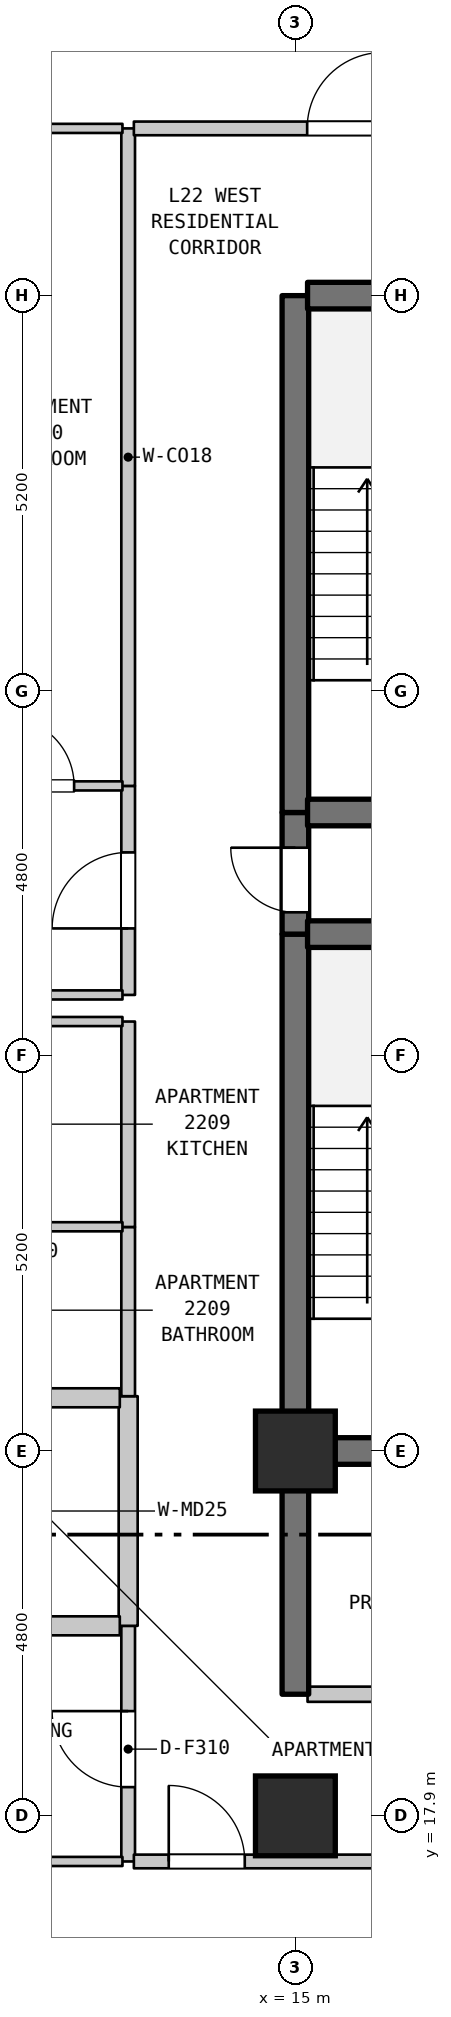
"""IFC4 building model, lengths in metres.
Left out: names, types, materials, properties, quantities, classifications, styles, units other than length and angle.
Written with IfcOpenShell. Run it as: python <this file> out.ifc"""

import sys

from ifc_helpers import new_model, si_unit, direction, frame, frame_2d, origin, origin_2d, place, context, subcontext, project, spatial, rectangle, extrude, element, fill, save


model = new_model("IFC4")
c1 = context("Model", 3, precision=1e-05, world=origin(), true_north=direction((0.0, 1.0)))
c2 = subcontext(c1, "Body", "Model", "MODEL_VIEW")
j1 = project(units=[si_unit("LENGTHUNIT", "METRE"), si_unit("PLANEANGLEUNIT", "RADIAN")], contexts=[c1])
p1 = place(None, origin())
s1 = spatial("IfcSite", under=j1, at=p1, CompositionType="ELEMENT")
p2 = place(p1, origin())
s2 = spatial("IfcBuilding", under=s1, at=p2, CompositionType="ELEMENT")
p3 = place(p2, frame((0.0, 0.0, 94.6)))
s3 = spatial("IfcBuildingStorey", under=s2, at=p3, CompositionType="ELEMENT", Elevation=94.6)
for number, where, z_axis, x_axis in (
    (1, (15.0, 17.9, 0.0), (0.0, 0.0, 1.0), (1.0, 0.0, 0.0)),
    (2, (15.0, 22.7, 0.0), (0.0, 0.0, 1.0), (1.0, 0.0, 0.0)),
):
    element("IfcColumn", number, at=place(p3, frame(where, z_axis=z_axis, x_axis=x_axis)), inside=s3, PredefinedType="COLUMN", context=c2, shape_type="SweptSolid", body=[
        extrude(rectangle(XDim=1.05, YDim=1.05, at=origin_2d()), origin(), (0.0, 0.0, 1.0), 3.7),
    ])
p4 = place(p3, frame((12.8, 17.3, 0.0), z_axis=(0.0, 0.0, 1.0), x_axis=(0.0, 1.0, 0.0)))
e3 = element("IfcWall", 3, at=p4, inside=s3, PredefinedType="STANDARD", context=c2, shape_type="SweptSolid", body=[
    extrude(rectangle(XDim=3.1, YDim=0.18, at=frame_2d((1.55, 0.0))), origin(), (0.0, 0.0, 1.0), 3.385),
])
p5 = place(p4, frame((0.978, 0.0, 0.0)))
e4 = element("IfcOpeningElement", 4, at=p5, cuts=e3, PredefinedType="OPENING", context=c2, shape_type="SweptSolid", body=[
    extrude(rectangle(XDim=1.0, YDim=2.15, at=frame_2d((0.5, 1.075))), frame((0.0, 0.1, 0.0), z_axis=(0.0, -1.0, 0.0), x_axis=(1.0, 0.0, 0.0)), (0.0, 0.0, 1.0), 0.2),
])
p6 = place(p3, frame((12.8, 20.4, 0.0), z_axis=(0.0, 0.0, 1.0), x_axis=(0.0, 1.0, 0.0)))
e5 = element("IfcWall", 5, at=p6, inside=s3, PredefinedType="STANDARD", context=c2, shape_type="SweptSolid", body=[
    extrude(rectangle(XDim=3.021, YDim=0.25, at=frame_2d((1.51, 0.0))), origin(), (0.0, 0.0, 1.0), 3.385),
])
p7 = place(p3, frame((12.8, 23.421, 0.0), z_axis=(0.0, 0.0, 1.0), x_axis=(0.0, 1.0, 0.0)))
e6 = element("IfcWall", 6, at=p7, inside=s3, PredefinedType="STANDARD", context=c2, shape_type="SweptSolid", body=[
    extrude(rectangle(XDim=2.226, YDim=0.18, at=frame_2d((1.113, 0.0))), origin(), (0.0, 0.0, 1.0), 3.385),
])
p8 = place(p3, frame((12.8, 25.647, 0.0), z_axis=(0.0, 0.0, 1.0), x_axis=(0.0, 1.0, 0.0)))
e7 = element("IfcWall", 7, at=p8, inside=s3, PredefinedType="STANDARD", context=c2, shape_type="SweptSolid", body=[
    extrude(rectangle(XDim=2.703, YDim=0.18, at=frame_2d((1.352, 0.0))), origin(), (0.0, 0.0, 1.0), 3.385),
])
p9 = place(p3, frame((12.8, 28.7, 0.0), z_axis=(0.0, 0.0, 1.0), x_axis=(0.0, 1.0, 0.0)))
e8 = element("IfcWall", 8, at=p9, inside=s3, PredefinedType="STANDARD", context=c2, shape_type="SweptSolid", body=[
    extrude(rectangle(XDim=2.75, YDim=0.18, at=frame_2d((1.375, 0.0))), origin(), (0.0, 0.0, 1.0), 3.385),
])
p10 = place(p9, frame((0.875, 0.0, 0.0)))
e9 = element("IfcOpeningElement", 9, at=p10, cuts=e8, PredefinedType="OPENING", context=c2, shape_type="SweptSolid", body=[
    extrude(rectangle(XDim=1.0, YDim=2.15, at=frame_2d((0.5, 1.075))), frame((0.0, 0.1, 0.0), z_axis=(0.0, -1.0, 0.0), x_axis=(1.0, 0.0, 0.0)), (0.0, 0.0, 1.0), 0.2),
])
p11 = place(p3, frame((12.8, 31.45, 0.0), z_axis=(0.0, 0.0, 1.0), x_axis=(0.0, 1.0, 0.0)))
e10 = element("IfcWall", 10, at=p11, inside=s3, PredefinedType="STANDARD", context=c2, shape_type="SweptSolid", body=[
    extrude(rectangle(XDim=8.65, YDim=0.18, at=frame_2d((4.325, 0.0))), origin(), (0.0, 0.0, 1.0), 3.385),
])
p12 = place(p3, frame((15.0, 19.5, 0.0), z_axis=(0.0, 0.0, 1.0), x_axis=(0.0, 1.0, 0.0)))
e11 = element("IfcWall", 11, at=p12, inside=s3, PredefinedType="SHEAR", context=c2, shape_type="SweptSolid", body=[
    extrude(rectangle(XDim=3.2, YDim=0.35, at=frame_2d((1.6, 0.0))), origin(), (0.0, 0.0, 1.0), 3.385),
])
p13 = place(p3, frame((15.0, 22.7, 0.0), z_axis=(0.0, 0.0, 1.0), x_axis=(0.0, 1.0, 0.0)))
e12 = element("IfcWall", 12, at=p13, inside=s3, PredefinedType="SHEAR", context=c2, shape_type="SweptSolid", body=[
    extrude(rectangle(XDim=6.8, YDim=0.35, at=frame_2d((3.4, 0.0))), origin(), (0.0, 0.0, 1.0), 3.385),
])
p14 = place(p3, frame((15.0, 29.5, 0.0), z_axis=(0.0, 0.0, 1.0), x_axis=(0.0, 1.0, 0.0)))
e13 = element("IfcWall", 13, at=p14, inside=s3, PredefinedType="SHEAR", context=c2, shape_type="SweptSolid", body=[
    extrude(rectangle(XDim=1.6, YDim=0.35, at=frame_2d((0.8, 0.0))), origin(), (0.0, 0.0, 1.0), 3.385),
])
p15 = place(p14, frame((0.287, 0.0, 0.0)))
e14 = element("IfcOpeningElement", 14, at=p15, cuts=e13, PredefinedType="OPENING", context=c2, shape_type="SweptSolid", body=[
    extrude(rectangle(XDim=0.85, YDim=2.1, at=frame_2d((0.425, 1.05))), frame((0.0, 0.185, 0.0), z_axis=(0.0, -1.0, 0.0), x_axis=(1.0, 0.0, 0.0)), (0.0, 0.0, 1.0), 0.37),
])
p16 = place(p3, frame((15.0, 31.1, 0.0), z_axis=(0.0, 0.0, 1.0), x_axis=(0.0, 1.0, 0.0)))
e15 = element("IfcWall", 15, at=p16, inside=s3, PredefinedType="SHEAR", context=c2, shape_type="SweptSolid", body=[
    extrude(rectangle(XDim=6.8, YDim=0.35, at=frame_2d((3.4, 0.0))), origin(), (0.0, 0.0, 1.0), 3.385),
])
p17 = place(p3, frame((9.085, 17.3, 0.0), z_axis=(0.0, 0.0, 1.0), x_axis=(1.0, 0.0, 0.0)))
e16 = element("IfcWall", 16, at=p17, inside=s3, PredefinedType="PARTITIONING", context=c2, shape_type="SweptSolid", body=[
    extrude(rectangle(XDim=3.64, YDim=0.12, at=frame_2d((1.82, 0.0))), origin(), (0.0, 0.0, 1.0), 3.385),
])
p18 = place(p3, frame((12.875, 17.3, 0.0), z_axis=(0.0, 0.0, 1.0), x_axis=(1.0, 0.0, 0.0)))
e17 = element("IfcWall", 17, at=p18, inside=s3, PredefinedType="STANDARD", context=c2, shape_type="SweptSolid", body=[
    extrude(rectangle(XDim=3.5, YDim=0.18, at=frame_2d((1.75, 0.0))), origin(), (0.0, 0.0, 1.0), 3.385),
])
p19 = place(p18, frame((0.459, 0.0, 0.0)))
e18 = element("IfcOpeningElement", 18, at=p19, cuts=e17, PredefinedType="OPENING", context=c2, shape_type="SweptSolid", body=[
    extrude(rectangle(XDim=1.0, YDim=2.15, at=frame_2d((0.5, 1.075))), frame((0.0, 0.1, 0.0), z_axis=(0.0, -1.0, 0.0), x_axis=(1.0, 0.0, 0.0)), (0.0, 0.0, 1.0), 0.2),
])
p20 = place(p3, frame((15.16, 19.5, 0.0), z_axis=(0.0, 0.0, 1.0), x_axis=(1.0, 0.0, 0.0)))
e19 = element("IfcWall", 19, at=p20, inside=s3, PredefinedType="STANDARD", context=c2, shape_type="SweptSolid", body=[
    extrude(rectangle(XDim=3.68, YDim=0.2, at=frame_2d((1.84, 0.0))), origin(), (0.0, 0.0, 1.0), 3.385),
])
p21 = place(p20, frame((1.39, 0.0, 0.0)))
e20 = element("IfcOpeningElement", 20, at=p21, cuts=e19, PredefinedType="OPENING", context=c2, shape_type="SweptSolid", body=[
    extrude(rectangle(XDim=0.9, YDim=2.15, at=frame_2d((0.45, 1.075))), frame((0.0, 0.11, 0.0), z_axis=(0.0, -1.0, 0.0), x_axis=(1.0, 0.0, 0.0)), (0.0, 0.0, 1.0), 0.22),
])
p22 = place(p3, frame((10.66, 20.4, 0.0), z_axis=(0.0, 0.0, 1.0), x_axis=(1.0, 0.0, 0.0)))
e21 = element("IfcWall", 21, at=p22, inside=s3, PredefinedType="STANDARD", context=c2, shape_type="SweptSolid", body=[
    extrude(rectangle(XDim=2.03, YDim=0.25, at=frame_2d((1.015, 0.0))), origin(), (0.0, 0.0, 1.0), 3.385),
])
p23 = place(p3, frame((15.16, 22.7, 0.0), z_axis=(0.0, 0.0, 1.0), x_axis=(1.0, 0.0, 0.0)))
e22 = element("IfcWall", 22, at=p23, inside=s3, PredefinedType="SHEAR", context=c2, shape_type="SweptSolid", body=[
    extrude(rectangle(XDim=3.68, YDim=0.35, at=frame_2d((1.84, 0.0))), origin(), (0.0, 0.0, 1.0), 3.385),
])
p24 = place(p3, frame((10.66, 23.4, 0.0), z_axis=(0.0, 0.0, 1.0), x_axis=(1.0, 0.0, 0.0)))
e23 = element("IfcWall", 23, at=p24, inside=s3, PredefinedType="STANDARD", context=c2, shape_type="SweptSolid", body=[
    extrude(rectangle(XDim=2.03, YDim=0.25, at=frame_2d((1.015, 0.0))), origin(), (0.0, 0.0, 1.0), 3.385),
])
for number, where, z_axis, x_axis in (
    (24, (10.595, 25.65, 0.0), (0.0, 0.0, 1.0), (1.0, 0.0, 0.0)),
    (25, (10.595, 28.35, 0.0), (0.0, 0.0, 1.0), (1.0, 0.0, 0.0)),
):
    element("IfcWall", number, at=place(p3, frame(where, z_axis=z_axis, x_axis=x_axis)), inside=s3, PredefinedType="PARTITIONING", context=c2, shape_type="SweptSolid", body=[
        extrude(rectangle(XDim=2.13, YDim=0.12, at=frame_2d((1.065, 0.0))), origin(), (0.0, 0.0, 1.0), 3.385),
    ])
p25 = place(p3, frame((9.03, 28.7, 0.0), z_axis=(0.0, 0.0, 1.0), x_axis=(1.0, 0.0, 0.0)))
e26 = element("IfcWall", 26, at=p25, inside=s3, PredefinedType="PARTITIONING", context=c2, shape_type="SweptSolid", body=[
    extrude(rectangle(XDim=3.695, YDim=0.12, at=frame_2d((1.848, 0.0))), origin(), (0.0, 0.0, 1.0), 3.385),
])
for number, where, z_axis, x_axis in (
    (27, (15.16, 29.5, 0.0), (0.0, 0.0, 1.0), (1.0, 0.0, 0.0)),
    (28, (15.16, 31.1, 0.0), (0.0, 0.0, 1.0), (1.0, 0.0, 0.0)),
):
    element("IfcWall", number, at=place(p3, frame(where, z_axis=z_axis, x_axis=x_axis)), inside=s3, PredefinedType="SHEAR", context=c2, shape_type="SweptSolid", body=[
        extrude(rectangle(XDim=3.68, YDim=0.35, at=frame_2d((1.84, 0.0))), origin(), (0.0, 0.0, 1.0), 3.385),
    ])
p26 = place(p3, frame((10.523, 31.45, 0.0), z_axis=(0.0, 0.0, 1.0), x_axis=(1.0, 0.0, 0.0)))
e29 = element("IfcWall", 29, at=p26, inside=s3, PredefinedType="PARTITIONING", context=c2, shape_type="SweptSolid", body=[
    extrude(rectangle(XDim=2.202, YDim=0.12, at=frame_2d((1.101, 0.0))), origin(), (0.0, 0.0, 1.0), 3.385),
])
p27 = place(p26, frame((0.666, 0.0, 0.0)))
e30 = element("IfcOpeningElement", 30, at=p27, cuts=e29, PredefinedType="OPENING", context=c2, shape_type="SweptSolid", body=[
    extrude(rectangle(XDim=0.9, YDim=2.1, at=frame_2d((0.45, 1.05))), frame((0.0, 0.07, 0.0), z_axis=(0.0, -1.0, 0.0), x_axis=(1.0, 0.0, 0.0)), (0.0, 0.0, 1.0), 0.14),
])
p28 = place(p3, frame((15.16, 37.9, 0.0), z_axis=(0.0, 0.0, 1.0), x_axis=(1.0, 0.0, 0.0)))
e31 = element("IfcWall", 31, at=p28, inside=s3, PredefinedType="SHEAR", context=c2, shape_type="SweptSolid", body=[
    extrude(rectangle(XDim=3.68, YDim=0.35, at=frame_2d((1.84, 0.0))), origin(), (0.0, 0.0, 1.0), 3.385),
])
p29 = place(p3, frame((10.523, 40.1, 0.0), z_axis=(0.0, 0.0, 1.0), x_axis=(1.0, 0.0, 0.0)))
e32 = element("IfcWall", 32, at=p29, inside=s3, PredefinedType="PARTITIONING", context=c2, shape_type="SweptSolid", body=[
    extrude(rectangle(XDim=2.202, YDim=0.12, at=frame_2d((1.101, 0.0))), origin(), (0.0, 0.0, 1.0), 3.385),
])
p30 = place(p3, frame((12.875, 40.1, 0.0), z_axis=(0.0, 0.0, 1.0), x_axis=(1.0, 0.0, 0.0)))
e33 = element("IfcWall", 33, at=p30, inside=s3, PredefinedType="STANDARD", context=c2, shape_type="SweptSolid", body=[
    extrude(rectangle(XDim=5.59, YDim=0.18, at=frame_2d((2.795, 0.0))), origin(), (0.0, 0.0, 1.0), 3.385),
])
p31 = place(p30, frame((2.28, 0.0, 0.0)))
e34 = element("IfcOpeningElement", 34, at=p31, cuts=e33, PredefinedType="OPENING", context=c2, shape_type="SweptSolid", body=[
    extrude(rectangle(XDim=1.0, YDim=2.15, at=frame_2d((0.5, 1.075))), frame((0.0, 0.1, 0.0), z_axis=(0.0, -1.0, 0.0), x_axis=(1.0, 0.0, 0.0)), (0.0, 0.0, 1.0), 0.2),
])
p32 = place(p5, origin())
e35 = element("IfcDoor", 35, at=p32, inside=s3, OperationType="SINGLE_SWING_RIGHT", PredefinedType="DOOR", context=c2, shape_type="SweptSolid", body=[
    extrude(rectangle(XDim=1.0, YDim=2.15, at=frame_2d((0.5, 1.075))), frame((0.0, 0.025, 0.0), z_axis=(0.0, -1.0, 0.0), x_axis=(1.0, 0.0, 0.0)), (0.0, 0.0, 1.0), 0.05),
])
fill(e4, e35)
p33 = place(p10, origin())
e36 = element("IfcDoor", 36, at=p33, inside=s3, OperationType="SINGLE_SWING_LEFT", PredefinedType="DOOR", context=c2, shape_type="SweptSolid", body=[
    extrude(rectangle(XDim=1.0, YDim=2.15, at=frame_2d((0.5, 1.075))), frame((0.0, 0.025, 0.0), z_axis=(0.0, -1.0, 0.0), x_axis=(1.0, 0.0, 0.0)), (0.0, 0.0, 1.0), 0.05),
])
fill(e9, e36)
p34 = place(p15, origin())
e37 = element("IfcDoor", 37, at=p34, inside=s3, OperationType="SINGLE_SWING_RIGHT", PredefinedType="DOOR", context=c2, shape_type="SweptSolid", body=[
    extrude(rectangle(XDim=0.85, YDim=2.1, at=frame_2d((0.425, 1.05))), frame((0.0, 0.025, 0.0), z_axis=(0.0, -1.0, 0.0), x_axis=(1.0, 0.0, 0.0)), (0.0, 0.0, 1.0), 0.05),
])
fill(e14, e37)
p35 = place(p19, origin())
e38 = element("IfcDoor", 38, at=p35, inside=s3, OperationType="SINGLE_SWING_LEFT", PredefinedType="DOOR", context=c2, shape_type="SweptSolid", body=[
    extrude(rectangle(XDim=1.0, YDim=2.15, at=frame_2d((0.5, 1.075))), frame((0.0, 0.025, 0.0), z_axis=(0.0, -1.0, 0.0), x_axis=(1.0, 0.0, 0.0)), (0.0, 0.0, 1.0), 0.05),
])
fill(e18, e38)
p36 = place(p27, origin())
e39 = element("IfcDoor", 39, at=p36, inside=s3, OperationType="SINGLE_SWING_LEFT", PredefinedType="DOOR", context=c2, shape_type="SweptSolid", body=[
    extrude(rectangle(XDim=0.9, YDim=2.1, at=frame_2d((0.45, 1.05))), frame((0.0, 0.025, 0.0), z_axis=(0.0, -1.0, 0.0), x_axis=(1.0, 0.0, 0.0)), (0.0, 0.0, 1.0), 0.05),
])
fill(e30, e39)
p37 = place(p31, origin())
e40 = element("IfcDoor", 40, at=p37, inside=s3, OperationType="SINGLE_SWING_RIGHT", PredefinedType="DOOR", context=c2, shape_type="SweptSolid", body=[
    extrude(rectangle(XDim=1.0, YDim=2.15, at=frame_2d((0.5, 1.075))), frame((0.0, 0.025, 0.0), z_axis=(0.0, -1.0, 0.0), x_axis=(1.0, 0.0, 0.0)), (0.0, 0.0, 1.0), 0.05),
])
fill(e34, e40)
save(model, sys.argv[1])
